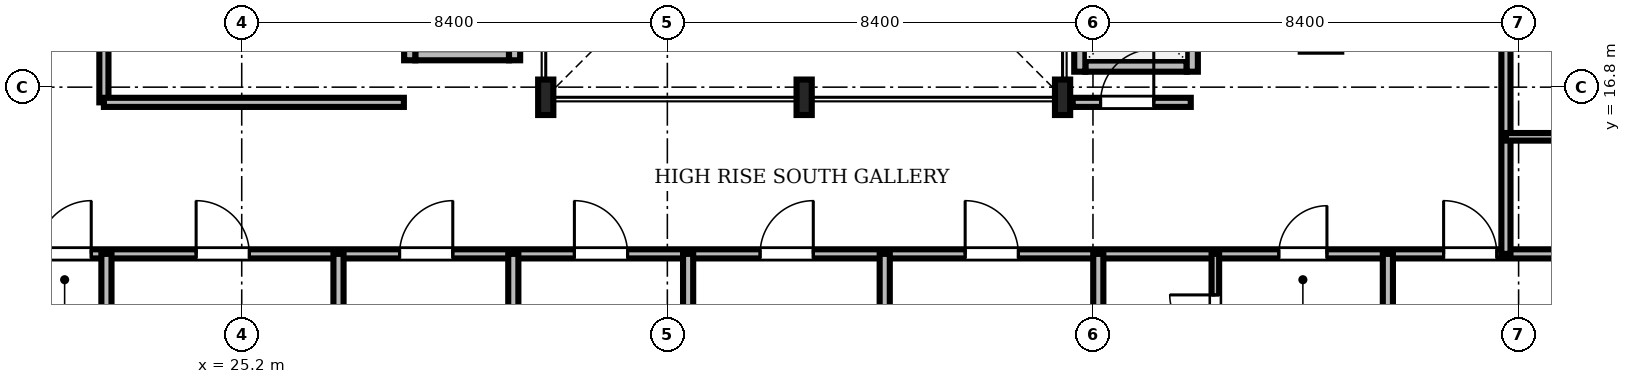
"""IFC4 building model, lengths in metres.
Left out: names, types, materials, properties, quantities, classifications, styles, units other than length and angle.
Written with IfcOpenShell. Run it as: python <this file> out.ifc"""

import sys

from ifc_helpers import new_model, si_unit, direction, frame, frame_2d, origin, origin_2d, place, context, subcontext, project, spatial, rectangle, i_section, extrude, source, transform, mapped, element, fill, save


model = new_model("IFC4")
c1 = context("Model", 3, precision=1e-05, world=origin(), true_north=direction((0.0, 1.0)))
c2 = subcontext(c1, "Body", "Model", "MODEL_VIEW")
j1 = project(units=[si_unit("LENGTHUNIT", "METRE"), si_unit("PLANEANGLEUNIT", "RADIAN")], contexts=[c1])
p1 = place(None, origin())
s1 = spatial("IfcSite", under=j1, at=p1, CompositionType="ELEMENT")
p2 = place(p1, origin())
s2 = spatial("IfcBuilding", under=s1, at=p2, CompositionType="ELEMENT")
p3 = place(p2, frame((0.0, 0.0, 184.8)))
s3 = spatial("IfcBuildingStorey", under=s2, at=p3, CompositionType="ELEMENT", Elevation=184.8)
m1 = source(origin(), c2, "Body", "SweptSolid", [
    extrude(i_section(OverallWidth=0.3, OverallDepth=0.7, WebThickness=0.017, FlangeThickness=0.032, FilletRadius=0.027, at=origin_2d()), origin(), (0.0, 0.0, 1.0), 3.53),
])
for number, where, z_axis, x_axis in (
    (1, (31.2, 16.6, 0.0), (0.0, 0.0, 1.0), (1.0, 0.0, 0.0)),
    (2, (36.3, 16.6, 0.0), (0.0, 0.0, 1.0), (1.0, 0.0, 0.0)),
    (3, (41.4, 16.6, 0.0), (0.0, 0.0, 1.0), (1.0, 0.0, 0.0)),
):
    element("IfcColumn", number, at=place(p3, frame(where, z_axis=z_axis, x_axis=x_axis)), inside=s3, PredefinedType="COLUMN", context=c2, shape_type="MappedRepresentation", body=[
        mapped(m1, transform((0.0, 0.0, 0.0), scale=1.0)),
    ])
m2 = source(origin(), c2, "Body", "SweptSolid", [
    extrude(rectangle(XDim=2.0, YDim=0.22, at=frame_2d((1.0, 0.0))), origin(), (0.0, 0.0, 1.0), 3.53),
])
p4 = place(p3, frame((41.85, 17.215, 0.0), z_axis=(0.0, 0.0, 1.0), x_axis=(1.0, 0.0, 0.0)))
e4 = element("IfcWall", 4, at=p4, inside=s3, PredefinedType="SOLIDWALL", context=c2, shape_type="MappedRepresentation", body=[
    mapped(m2, transform((0.0, 0.0, 0.0), scale=1.0)),
])
m3 = source(origin(), c2, "Body", "SweptSolid", [
    extrude(rectangle(XDim=2.19, YDim=0.22, at=frame_2d((1.095, 0.0))), origin(), (0.0, 0.0, 1.0), 3.53),
])
p5 = place(p3, frame((41.74, 17.105, 0.0), z_axis=(0.0, 0.0, 1.0), x_axis=(0.0, 1.0, 0.0)))
e5 = element("IfcWall", 5, at=p5, inside=s3, PredefinedType="SOLIDWALL", context=c2, shape_type="MappedRepresentation", body=[
    mapped(m3, transform((0.0, 0.0, 0.0), scale=1.0)),
])
p6 = place(p3, frame((43.96, 17.105, 0.0), z_axis=(0.0, 0.0, 1.0), x_axis=(0.0, 1.0, 0.0)))
e6 = element("IfcWall", 6, at=p6, inside=s3, PredefinedType="SOLIDWALL", context=c2, shape_type="MappedRepresentation", body=[
    mapped(m3, transform((0.0, 0.0, 0.0), scale=1.0)),
])
m4 = source(origin(), c2, "Body", "SweptSolid", [
    extrude(rectangle(XDim=1.1, YDim=2.2, at=frame_2d((0.55, 1.1))), frame((0.0, 0.12, 0.0), z_axis=(0.0, -1.0, 0.0), x_axis=(1.0, 0.0, 0.0)), (0.0, 0.0, 1.0), 0.24),
])
p7 = place(p6, frame((0.545, 0.0, 0.0)))
e7 = element("IfcOpeningElement", 7, at=p7, cuts=e6, PredefinedType="OPENING", context=c2, shape_type="MappedRepresentation", body=[
    mapped(m4, transform((0.0, 0.0, 0.0), scale=1.0)),
])
m5 = source(origin(), c2, "Body", "SweptSolid", [
    extrude(rectangle(XDim=1.85, YDim=0.22, at=frame_2d((0.925, 0.0))), origin(), (0.0, 0.0, 1.0), 2.972),
])
p8 = place(p3, frame((28.625, 17.44, 0.0), z_axis=(0.0, 0.0, 1.0), x_axis=(1.0, 0.0, 0.0)))
e8 = element("IfcWall", 8, at=p8, inside=s3, PredefinedType="SOLIDWALL", context=c2, shape_type="MappedRepresentation", body=[
    mapped(m5, transform((0.0, 0.0, 0.0), scale=1.0)),
])
m6 = source(origin(), c2, "Body", "SweptSolid", [
    extrude(rectangle(XDim=2.54, YDim=0.22, at=frame_2d((1.27, 0.0))), origin(), (0.0, 0.0, 1.0), 2.972),
])
p9 = place(p3, frame((28.515, 17.33, 0.0), z_axis=(0.0, 0.0, 1.0), x_axis=(0.0, 1.0, 0.0)))
e9 = element("IfcWall", 9, at=p9, inside=s3, PredefinedType="SOLIDWALL", context=c2, shape_type="MappedRepresentation", body=[
    mapped(m6, transform((0.0, 0.0, 0.0), scale=1.0)),
])
m7 = source(origin(), c2, "Body", "SweptSolid", [
    extrude(rectangle(XDim=2.54, YDim=0.22, at=frame_2d((1.27, 0.0))), origin(), (0.0, 0.0, 1.0), 3.53),
])
p10 = place(p3, frame((30.585, 17.33, 0.0), z_axis=(0.0, 0.0, 1.0), x_axis=(0.0, 1.0, 0.0)))
e10 = element("IfcWall", 10, at=p10, inside=s3, PredefinedType="SOLIDWALL", context=c2, shape_type="MappedRepresentation", body=[
    mapped(m7, transform((0.0, 0.0, 0.0), scale=1.0)),
])
m8 = source(origin(), c2, "Body", "SweptSolid", [
    extrude(rectangle(XDim=46.156, YDim=0.18, at=frame_2d((23.078, 0.0))), origin(), (0.0, 0.0, 1.0), 2.772),
])
p11 = place(p3, frame((11.422, 13.51, 0.0), z_axis=(0.0, 0.0, 1.0), x_axis=(1.0, 0.0, 0.0)))
e11 = element("IfcWall", 11, at=p11, inside=s3, PredefinedType="PARTITIONING", context=c2, shape_type="MappedRepresentation", body=[
    mapped(m8, transform((0.0, 0.0, 0.0), scale=1.0)),
])
m9 = source(origin(), c2, "Body", "SweptSolid", [
    extrude(rectangle(XDim=1.05, YDim=2.2, at=frame_2d((0.525, 1.1))), frame((0.0, 0.1, 0.0), z_axis=(0.0, -1.0, 0.0), x_axis=(1.0, 0.0, 0.0)), (0.0, 0.0, 1.0), 0.2),
])
p12 = place(p11, frame((9.758, 0.0, 0.0)))
e12 = element("IfcOpeningElement", 12, at=p12, cuts=e11, PredefinedType="OPENING", context=c2, shape_type="MappedRepresentation", body=[
    mapped(m9, transform((0.0, 0.0, 0.0), scale=1.0)),
])
p13 = place(p11, frame((12.878, 0.0, 0.0)))
e13 = element("IfcOpeningElement", 13, at=p13, cuts=e11, PredefinedType="OPENING", context=c2, shape_type="MappedRepresentation", body=[
    mapped(m9, transform((0.0, 0.0, 0.0), scale=1.0)),
])
p14 = place(p11, frame((16.893, 0.0, 0.0)))
e14 = element("IfcOpeningElement", 14, at=p14, cuts=e11, PredefinedType="OPENING", context=c2, shape_type="MappedRepresentation", body=[
    mapped(m9, transform((0.0, 0.0, 0.0), scale=1.0)),
])
p15 = place(p11, frame((20.344, 0.0, 0.0)))
e15 = element("IfcOpeningElement", 15, at=p15, cuts=e11, PredefinedType="OPENING", context=c2, shape_type="MappedRepresentation", body=[
    mapped(m9, transform((0.0, 0.0, 0.0), scale=1.0)),
])
p16 = place(p11, frame((24.008, 0.0, 0.0)))
e16 = element("IfcOpeningElement", 16, at=p16, cuts=e11, PredefinedType="OPENING", context=c2, shape_type="MappedRepresentation", body=[
    mapped(m9, transform((0.0, 0.0, 0.0), scale=1.0)),
])
p17 = place(p11, frame((28.055, 0.0, 0.0)))
e17 = element("IfcOpeningElement", 17, at=p17, cuts=e11, PredefinedType="OPENING", context=c2, shape_type="MappedRepresentation", body=[
    mapped(m9, transform((0.0, 0.0, 0.0), scale=1.0)),
])
m10 = source(origin(), c2, "Body", "SweptSolid", [
    extrude(rectangle(XDim=0.95, YDim=2.15, at=frame_2d((0.475, 1.075))), frame((0.0, 0.1, 0.0), z_axis=(0.0, -1.0, 0.0), x_axis=(1.0, 0.0, 0.0)), (0.0, 0.0, 1.0), 0.2),
])
p18 = place(p11, frame((34.246, 0.0, 0.0)))
e18 = element("IfcOpeningElement", 18, at=p18, cuts=e11, PredefinedType="OPENING", context=c2, shape_type="MappedRepresentation", body=[
    mapped(m10, transform((0.0, 0.0, 0.0), scale=1.0)),
])
p19 = place(p11, frame((37.498, 0.0, 0.0)))
e19 = element("IfcOpeningElement", 19, at=p19, cuts=e11, PredefinedType="OPENING", context=c2, shape_type="MappedRepresentation", body=[
    mapped(m9, transform((0.0, 0.0, 0.0), scale=1.0)),
])
m11 = source(origin(), c2, "Body", "SweptSolid", [
    extrude(rectangle(XDim=27.59, YDim=0.18, at=frame_2d((13.795, 0.0))), origin(), (0.0, 0.0, 1.0), 2.972),
])
p20 = place(p3, frame((50.15, 13.51, 0.0), z_axis=(0.0, 0.0, 1.0), x_axis=(0.0, 1.0, 0.0)))
e20 = element("IfcWall", 20, at=p20, inside=s3, PredefinedType="PARTITIONING", context=c2, shape_type="MappedRepresentation", body=[
    mapped(m11, transform((0.0, 0.0, 0.0), scale=1.0)),
])
p21 = place(p20, frame((4.086, 0.0, 0.0)))
e21 = element("IfcOpeningElement", 21, at=p21, cuts=e20, PredefinedType="OPENING", context=c2, shape_type="MappedRepresentation", body=[
    mapped(m9, transform((0.0, 0.0, 0.0), scale=1.0)),
])
p22 = place(p20, frame((9.744, 0.0, 0.0)))
e22 = element("IfcOpeningElement", 22, at=p22, cuts=e20, PredefinedType="OPENING", context=c2, shape_type="MappedRepresentation", body=[
    mapped(m9, transform((0.0, 0.0, 0.0), scale=1.0)),
])
p23 = place(p20, frame((17.771, 0.0, 0.0)))
e23 = element("IfcOpeningElement", 23, at=p23, cuts=e20, PredefinedType="OPENING", context=c2, shape_type="MappedRepresentation", body=[
    mapped(m9, transform((0.0, 0.0, 0.0), scale=1.0)),
])
p24 = place(p20, frame((24.614, 0.0, 0.0)))
e24 = element("IfcOpeningElement", 24, at=p24, cuts=e20, PredefinedType="OPENING", context=c2, shape_type="MappedRepresentation", body=[
    mapped(m9, transform((0.0, 0.0, 0.0), scale=1.0)),
])
m12 = source(origin(), c2, "Body", "SweptSolid", [
    extrude(rectangle(XDim=3.55, YDim=0.18, at=frame_2d((1.775, 0.0))), origin(), (0.0, 0.0, 1.0), 2.972),
])
p25 = place(p3, frame((22.48, 16.5, 0.0), z_axis=(0.0, 0.0, 1.0), x_axis=(0.0, 1.0, 0.0)))
e25 = element("IfcWall", 25, at=p25, inside=s3, PredefinedType="PARTITIONING", context=c2, shape_type="MappedRepresentation", body=[
    mapped(m12, transform((0.0, 0.0, 0.0), scale=1.0)),
])
p26 = place(p25, frame((1.15, 0.0, 0.0)))
e26 = element("IfcOpeningElement", 26, at=p26, cuts=e25, PredefinedType="OPENING", context=c2, shape_type="MappedRepresentation", body=[
    mapped(m9, transform((0.0, 0.0, 0.0), scale=1.0)),
])
m13 = source(origin(), c2, "Body", "SweptSolid", [
    extrude(rectangle(XDim=2.36, YDim=0.15, at=frame_2d((1.18, 0.0))), origin(), (0.0, 0.0, 1.0), 3.192),
])
p27 = place(p3, frame((44.415, 11.15, 0.0), z_axis=(0.0, 0.0, 1.0), x_axis=(0.0, 1.0, 0.0)))
e27 = element("IfcWall", 27, at=p27, inside=s3, PredefinedType="PARTITIONING", context=c2, shape_type="MappedRepresentation", body=[
    mapped(m13, transform((0.0, 0.0, 0.0), scale=1.0)),
])
m14 = source(origin(), c2, "Body", "SweptSolid", [
    extrude(rectangle(XDim=0.9, YDim=2.1, at=frame_2d((0.45, 1.05))), frame((0.0, 0.085, 0.0), z_axis=(0.0, -1.0, 0.0), x_axis=(1.0, 0.0, 0.0)), (0.0, 0.0, 1.0), 0.17),
])
p28 = place(p27, frame((0.65, 0.0, 0.0)))
e28 = element("IfcOpeningElement", 28, at=p28, cuts=e27, PredefinedType="OPENING", context=c2, shape_type="MappedRepresentation", body=[
    mapped(m14, transform((0.0, 0.0, 0.0), scale=1.0)),
])
m15 = source(origin(), c2, "Body", "SweptSolid", [
    extrude(rectangle(XDim=2.33, YDim=0.18, at=frame_2d((1.165, 0.0))), origin(), (0.0, 0.0, 1.0), 2.972),
])
p29 = place(p3, frame((41.6, 16.5, 0.0), z_axis=(0.0, 0.0, 1.0), x_axis=(1.0, 0.0, 0.0)))
e29 = element("IfcWall", 29, at=p29, inside=s3, PredefinedType="PARTITIONING", context=c2, shape_type="MappedRepresentation", body=[
    mapped(m15, transform((0.0, 0.0, 0.0), scale=1.0)),
])
p30 = place(p29, frame((0.55, 0.0, 0.0)))
e30 = element("IfcOpeningElement", 30, at=p30, cuts=e29, PredefinedType="OPENING", context=c2, shape_type="MappedRepresentation", body=[
    mapped(m9, transform((0.0, 0.0, 0.0), scale=1.0)),
])
m16 = source(origin(), c2, "Body", "SweptSolid", [
    extrude(rectangle(XDim=11.388, YDim=0.2, at=frame_2d((5.694, 0.0))), origin(), (0.0, 0.0, 1.0), 2.772),
])
for number, where, z_axis, x_axis in (
    (31, (22.53, 2.122, 0.0), (0.0, 0.0, 1.0), (0.0, 1.0, 0.0)),
    (32, (27.11, 2.122, 0.0), (0.0, 0.0, 1.0), (0.0, 1.0, 0.0)),
    (33, (30.56, 2.122, 0.0), (0.0, 0.0, 1.0), (0.0, 1.0, 0.0)),
):
    element("IfcWall", number, at=place(p3, frame(where, z_axis=z_axis, x_axis=x_axis)), inside=s3, PredefinedType="PARTITIONING", context=c2, shape_type="MappedRepresentation", body=[
        mapped(m16, transform((0.0, 0.0, 0.0), scale=1.0)),
    ])
m17 = source(origin(), c2, "Body", "SweptSolid", [
    extrude(rectangle(XDim=11.58, YDim=0.2, at=frame_2d((5.79, 0.0))), origin(), (0.0, 0.0, 1.0), 2.772),
])
p31 = place(p3, frame((34.01, 1.93, 0.0), z_axis=(0.0, 0.0, 1.0), x_axis=(0.0, 1.0, 0.0)))
e34 = element("IfcWall", 34, at=p31, inside=s3, PredefinedType="PARTITIONING", context=c2, shape_type="MappedRepresentation", body=[
    mapped(m17, transform((0.0, 0.0, 0.0), scale=1.0)),
])
for number, where, z_axis, x_axis in (
    (35, (37.89, 2.122, 0.0), (0.0, 0.0, 1.0), (0.0, 1.0, 0.0)),
    (36, (42.105, 2.122, 0.0), (0.0, 0.0, 1.0), (0.0, 1.0, 0.0)),
    (37, (47.82, 2.122, 0.0), (0.0, 0.0, 1.0), (0.0, 1.0, 0.0)),
):
    element("IfcWall", number, at=place(p3, frame(where, z_axis=z_axis, x_axis=x_axis)), inside=s3, PredefinedType="PARTITIONING", context=c2, shape_type="MappedRepresentation", body=[
        mapped(m16, transform((0.0, 0.0, 0.0), scale=1.0)),
    ])
m18 = source(origin(), c2, "Body", "SweptSolid", [
    extrude(rectangle(XDim=5.92, YDim=0.18, at=frame_2d((2.96, 0.0))), origin(), (0.0, 0.0, 1.0), 3.53),
])
p32 = place(p3, frame((22.48, 16.5, 0.0), z_axis=(0.0, 0.0, 1.0), x_axis=(1.0, 0.0, 0.0)))
e38 = element("IfcWall", 38, at=p32, inside=s3, PredefinedType="PARTITIONING", context=c2, shape_type="MappedRepresentation", body=[
    mapped(m18, transform((0.0, 0.0, 0.0), scale=1.0)),
])
m19 = source(origin(), c2, "Body", "SweptSolid", [
    extrude(rectangle(XDim=2.36, YDim=0.15, at=frame_2d((1.18, 0.0))), origin(), (0.0, 0.0, 1.0), 3.53),
])
p33 = place(p3, frame((50.15, 15.82, 0.0), z_axis=(0.0, 0.0, 1.0), x_axis=(1.0, 0.0, 0.0)))
e39 = element("IfcWall", 39, at=p33, inside=s3, PredefinedType="PARTITIONING", context=c2, shape_type="MappedRepresentation", body=[
    mapped(m19, transform((0.0, 0.0, 0.0), scale=1.0)),
])
m20 = source(origin(), c2, "Body", "SweptSolid", [
    extrude(rectangle(XDim=1.05, YDim=2.2, at=frame_2d((0.525, 1.1))), frame((0.0, 0.025, 0.0), z_axis=(0.0, -1.0, 0.0), x_axis=(1.0, 0.0, 0.0)), (0.0, 0.0, 1.0), 0.05),
])
p34 = place(p12, origin())
e40 = element("IfcDoor", 40, at=p34, inside=s3, OperationType="SINGLE_SWING_RIGHT", PredefinedType="DOOR", context=c2, shape_type="MappedRepresentation", body=[
    mapped(m20, transform((0.0, 0.0, 0.0), scale=1.0)),
])
fill(e12, e40)
p35 = place(p13, origin())
e41 = element("IfcDoor", 41, at=p35, inside=s3, OperationType="SINGLE_SWING_LEFT", PredefinedType="DOOR", context=c2, shape_type="MappedRepresentation", body=[
    mapped(m20, transform((0.0, 0.0, 0.0), scale=1.0)),
])
fill(e13, e41)
p36 = place(p14, origin())
e42 = element("IfcDoor", 42, at=p36, inside=s3, OperationType="SINGLE_SWING_RIGHT", PredefinedType="DOOR", context=c2, shape_type="MappedRepresentation", body=[
    mapped(m20, transform((0.0, 0.0, 0.0), scale=1.0)),
])
fill(e14, e42)
p37 = place(p15, origin())
e43 = element("IfcDoor", 43, at=p37, inside=s3, OperationType="SINGLE_SWING_LEFT", PredefinedType="DOOR", context=c2, shape_type="MappedRepresentation", body=[
    mapped(m20, transform((0.0, 0.0, 0.0), scale=1.0)),
])
fill(e15, e43)
p38 = place(p16, origin())
e44 = element("IfcDoor", 44, at=p38, inside=s3, OperationType="SINGLE_SWING_RIGHT", PredefinedType="DOOR", context=c2, shape_type="MappedRepresentation", body=[
    mapped(m20, transform((0.0, 0.0, 0.0), scale=1.0)),
])
fill(e16, e44)
p39 = place(p17, origin())
e45 = element("IfcDoor", 45, at=p39, inside=s3, OperationType="SINGLE_SWING_LEFT", PredefinedType="DOOR", context=c2, shape_type="MappedRepresentation", body=[
    mapped(m20, transform((0.0, 0.0, 0.0), scale=1.0)),
])
fill(e17, e45)
m21 = source(origin(), c2, "Body", "SweptSolid", [
    extrude(rectangle(XDim=0.95, YDim=2.15, at=frame_2d((0.475, 1.075))), frame((0.0, 0.025, 0.0), z_axis=(0.0, -1.0, 0.0), x_axis=(1.0, 0.0, 0.0)), (0.0, 0.0, 1.0), 0.05),
])
p40 = place(p18, origin())
e46 = element("IfcDoor", 46, at=p40, inside=s3, OperationType="SINGLE_SWING_RIGHT", PredefinedType="DOOR", context=c2, shape_type="MappedRepresentation", body=[
    mapped(m21, transform((0.0, 0.0, 0.0), scale=1.0)),
])
fill(e18, e46)
p41 = place(p19, origin())
e47 = element("IfcDoor", 47, at=p41, inside=s3, OperationType="SINGLE_SWING_LEFT", PredefinedType="DOOR", context=c2, shape_type="MappedRepresentation", body=[
    mapped(m20, transform((0.0, 0.0, 0.0), scale=1.0)),
])
fill(e19, e47)
m22 = source(origin(), c2, "Body", "SweptSolid", [
    extrude(rectangle(XDim=0.9, YDim=2.1, at=frame_2d((0.45, 1.05))), frame((0.0, 0.025, 0.0), z_axis=(0.0, -1.0, 0.0), x_axis=(1.0, 0.0, 0.0)), (0.0, 0.0, 1.0), 0.05),
])
p42 = place(p28, origin())
e48 = element("IfcDoor", 48, at=p42, inside=s3, OperationType="SINGLE_SWING_RIGHT", PredefinedType="DOOR", context=c2, shape_type="MappedRepresentation", body=[
    mapped(m22, transform((0.0, 0.0, 0.0), scale=1.0)),
])
fill(e28, e48)
p43 = place(p30, origin())
e49 = element("IfcDoor", 49, at=p43, inside=s3, OperationType="SINGLE_SWING_RIGHT", PredefinedType="DOOR", context=c2, shape_type="MappedRepresentation", body=[
    mapped(m20, transform((0.0, 0.0, 0.0), scale=1.0)),
])
fill(e30, e49)
save(model, sys.argv[1])
